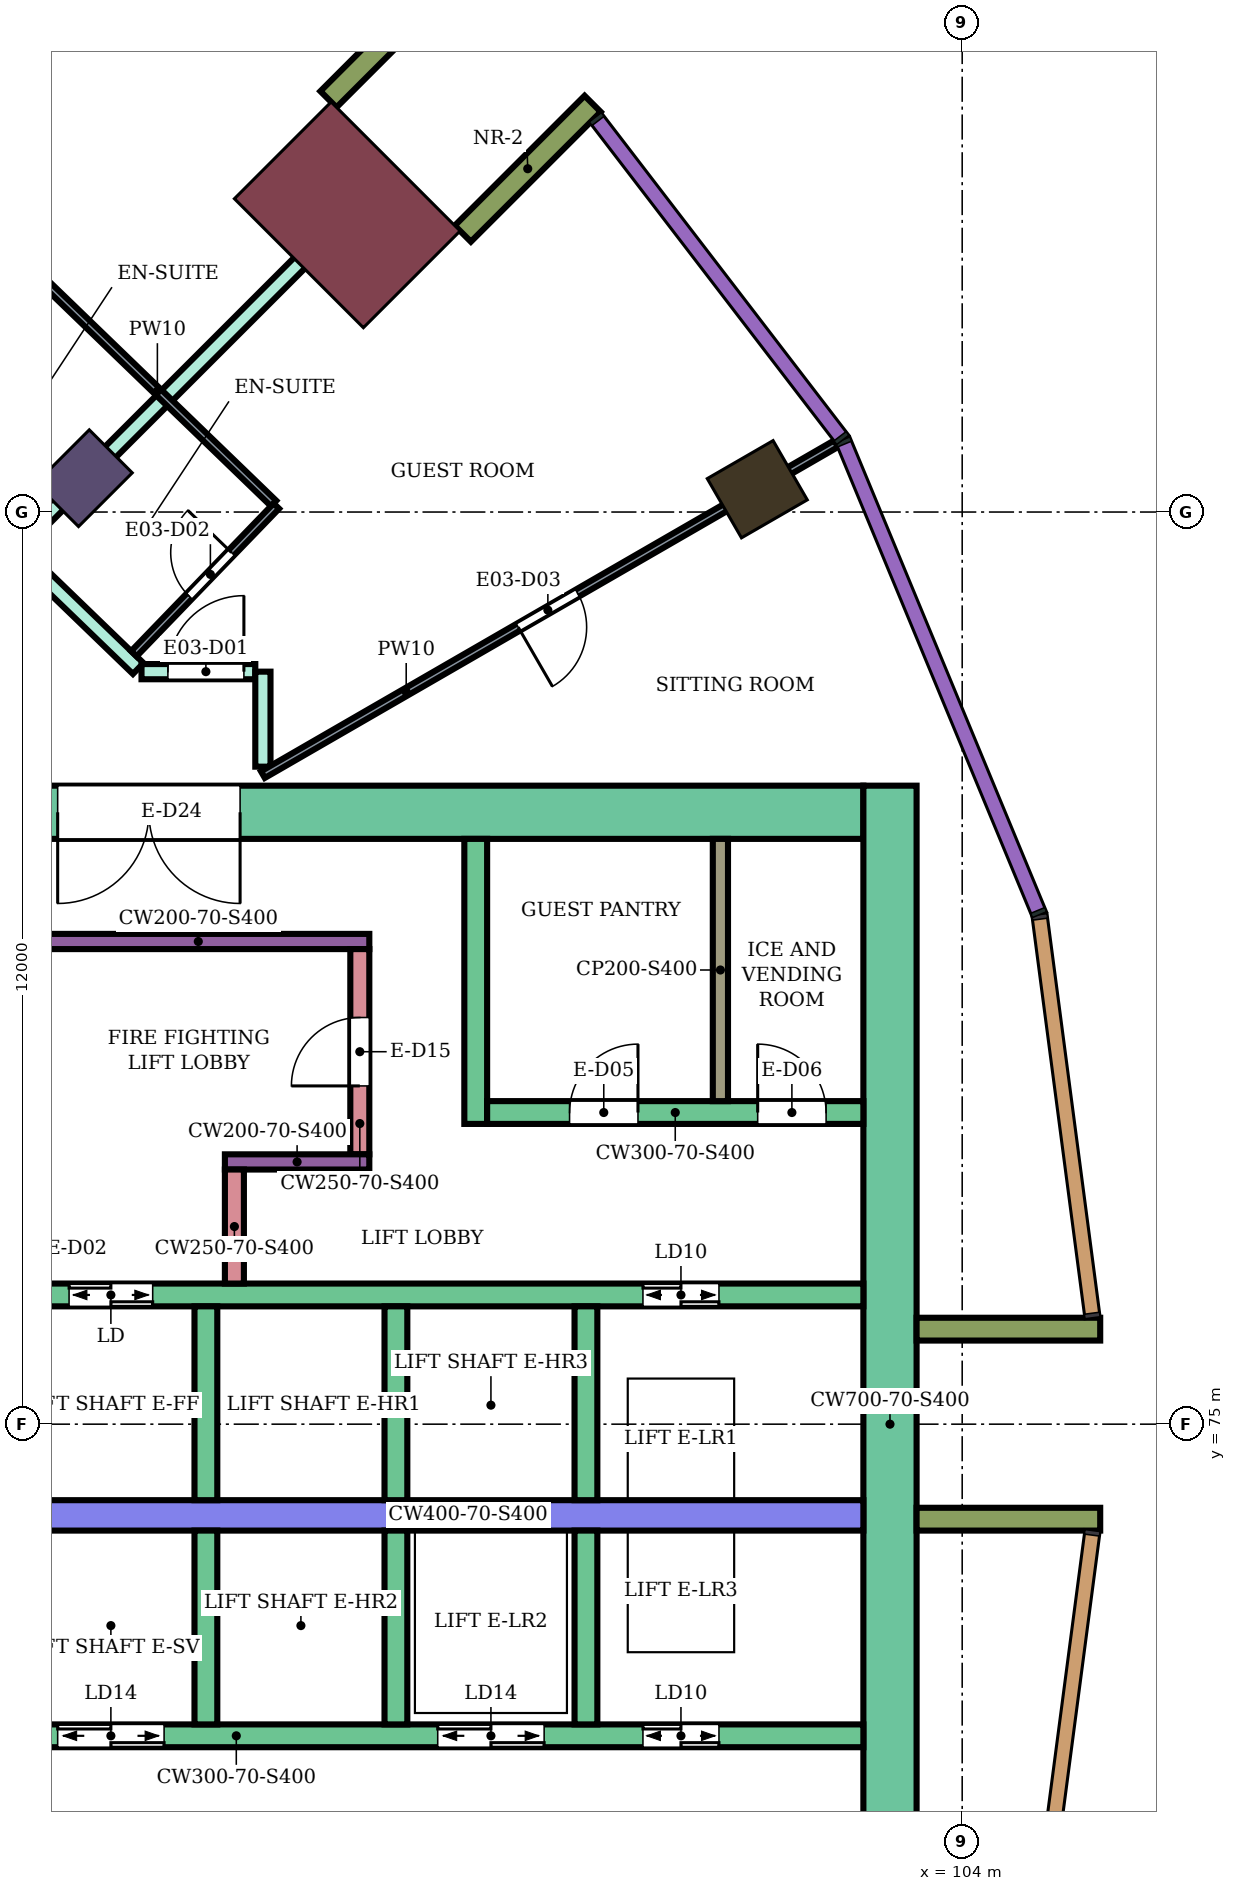
"""IFC4 building model, lengths in metres.
Left out: names, types, materials, properties, quantities, classifications, styles, units other than length and angle.
Written with IfcOpenShell. Run it as: python <this file> out.ifc"""

import sys

from ifc_helpers import new_model, si_unit, direction, frame, frame_2d, origin, origin_2d, place, context, subcontext, project, spatial, rectangle, extrude, element, fill, save


model = new_model("IFC4")
c1 = context("Model", 3, precision=1e-05, world=origin(), true_north=direction((0.0, 1.0)))
c2 = subcontext(c1, "Body", "Model", "MODEL_VIEW")
j1 = project(units=[si_unit("LENGTHUNIT", "METRE"), si_unit("PLANEANGLEUNIT", "RADIAN")], contexts=[c1])
p1 = place(None, origin())
s1 = spatial("IfcSite", under=j1, at=p1, CompositionType="ELEMENT")
p2 = place(p1, origin())
s2 = spatial("IfcBuilding", under=s1, at=p2, CompositionType="ELEMENT")
p3 = place(p2, frame((0.0, 0.0, 145.8)))
s3 = spatial("IfcBuildingStorey", under=s2, at=p3, CompositionType="ELEMENT", Elevation=145.8)
p4 = place(p3, frame((101.304, 87.3, 0.0), z_axis=(0.0, 0.0, 1.0), x_axis=(0.866025403784, 0.5, 0.0)))
e1 = element("IfcColumn", 1, at=p4, inside=s3, PredefinedType="COLUMN", context=c2, shape_type="SweptSolid", body=[
    extrude(rectangle(XDim=1.0, YDim=0.9, at=origin_2d()), origin(), (0.0, 0.0, 1.0), 3.9),
])
p5 = place(p3, frame((92.445, 87.445, 0.0), z_axis=(0.0, 0.0, 1.0), x_axis=(0.707106781187, 0.707106781187, 0.0)))
e2 = element("IfcColumn", 2, at=p5, inside=s3, PredefinedType="COLUMN", context=c2, shape_type="SweptSolid", body=[
    extrude(rectangle(XDim=1.0, YDim=0.8, at=origin_2d()), origin(), (0.0, 0.0, 1.0), 3.9),
])
p6 = place(p3, frame((95.91, 90.91, 0.0), z_axis=(0.0, 0.0, 1.0), x_axis=(0.707106781187, 0.707106781187, 0.0)))
e3 = element("IfcColumn", 3, at=p6, inside=s3, PredefinedType="COLUMN", context=c2, shape_type="SweptSolid", body=[
    extrude(rectangle(XDim=1.8, YDim=2.4, at=origin_2d()), origin(), (0.0, 0.0, 1.0), 3.9),
])
p7 = place(p3, frame((87.9, 83.05, 0.0), z_axis=(0.0, 0.0, 1.0), x_axis=(1.0, 0.0, 0.0)))
e4 = element("IfcWall", 4, at=p7, inside=s3, PredefinedType="SHEAR", context=c2, shape_type="SweptSolid", body=[
    extrude(rectangle(XDim=14.8, YDim=0.7, at=frame_2d((7.4, 0.0))), origin(), (0.0, 0.0, 1.0), 3.5),
])
p8 = place(p7, frame((4.2, 0.0, 0.0)))
e5 = element("IfcOpeningElement", 5, at=p8, cuts=e4, PredefinedType="OPENING", context=c2, shape_type="SweptSolid", body=[
    extrude(rectangle(XDim=2.4, YDim=2.4, at=frame_2d((1.2, 1.2))), frame((0.0, 0.36, 0.0), z_axis=(0.0, -1.0, 0.0), x_axis=(1.0, 0.0, 0.0)), (0.0, 0.0, 1.0), 0.72),
])
p9 = place(p3, frame((103.05, 66.6, 0.0), z_axis=(0.0, 0.0, 1.0), x_axis=(0.0, 1.0, 0.0)))
e6 = element("IfcWall", 6, at=p9, inside=s3, PredefinedType="SHEAR", context=c2, shape_type="SweptSolid", body=[
    extrude(rectangle(XDim=16.8, YDim=0.7, at=frame_2d((8.4, 0.0))), origin(), (0.0, 0.0, 1.0), 3.5),
])
p10 = place(p3, frame((91.7, 76.7, 0.0), z_axis=(0.0, 0.0, 1.0), x_axis=(1.0, 0.0, 0.0)))
e7 = element("IfcWall", 7, at=p10, inside=s3, PredefinedType="SHEAR", context=c2, shape_type="SweptSolid", body=[
    extrude(rectangle(XDim=11.0, YDim=0.3, at=frame_2d((5.5, 0.0))), origin(), (0.0, 0.0, 1.0), 3.5),
])
p11 = place(p10, frame((0.55, 0.0, 0.0)))
e8 = element("IfcOpeningElement", 8, at=p11, cuts=e7, PredefinedType="OPENING", context=c2, shape_type="SweptSolid", body=[
    extrude(rectangle(XDim=1.1, YDim=2.1, at=frame_2d((0.55, 1.05))), frame((0.0, 0.16, 0.0), z_axis=(0.0, -1.0, 0.0), x_axis=(1.0, 0.0, 0.0)), (0.0, 0.0, 1.0), 0.32),
])
p12 = place(p10, frame((8.1, 0.0, 0.0)))
e9 = element("IfcOpeningElement", 9, at=p12, cuts=e7, PredefinedType="OPENING", context=c2, shape_type="SweptSolid", body=[
    extrude(rectangle(XDim=1.0, YDim=2.1, at=frame_2d((0.5, 1.05))), frame((0.0, 0.16, 0.0), z_axis=(0.0, -1.0, 0.0), x_axis=(1.0, 0.0, 0.0)), (0.0, 0.0, 1.0), 0.32),
])
p13 = place(p3, frame((91.7, 73.8, 0.0), z_axis=(0.0, 0.0, 1.0), x_axis=(1.0, 0.0, 0.0)))
e10 = element("IfcWall", 10, at=p13, inside=s3, PredefinedType="SHEAR", context=c2, shape_type="SweptSolid", body=[
    extrude(rectangle(XDim=11.0, YDim=0.4, at=frame_2d((5.5, 0.0))), origin(), (0.0, 0.0, 1.0), 3.5),
])
p14 = place(p3, frame((91.7, 70.9, 0.0), z_axis=(0.0, 0.0, 1.0), x_axis=(1.0, 0.0, 0.0)))
e11 = element("IfcWall", 11, at=p14, inside=s3, PredefinedType="SHEAR", context=c2, shape_type="SweptSolid", body=[
    extrude(rectangle(XDim=11.0, YDim=0.3, at=frame_2d((5.5, 0.0))), origin(), (0.0, 0.0, 1.0), 3.5),
])
p15 = place(p14, frame((0.4, 0.0, 0.0)))
e12 = element("IfcOpeningElement", 12, at=p15, cuts=e11, PredefinedType="OPENING", context=c2, shape_type="SweptSolid", body=[
    extrude(rectangle(XDim=1.4, YDim=2.1, at=frame_2d((0.7, 1.05))), frame((0.0, 0.16, 0.0), z_axis=(0.0, -1.0, 0.0), x_axis=(1.0, 0.0, 0.0)), (0.0, 0.0, 1.0), 0.32),
])
p16 = place(p14, frame((5.4, 0.0, 0.0)))
e13 = element("IfcOpeningElement", 13, at=p16, cuts=e11, PredefinedType="OPENING", context=c2, shape_type="SweptSolid", body=[
    extrude(rectangle(XDim=1.4, YDim=2.1, at=frame_2d((0.7, 1.05))), frame((0.0, 0.16, 0.0), z_axis=(0.0, -1.0, 0.0), x_axis=(1.0, 0.0, 0.0)), (0.0, 0.0, 1.0), 0.32),
])
p17 = place(p14, frame((8.1, 0.0, 0.0)))
e14 = element("IfcOpeningElement", 14, at=p17, cuts=e11, PredefinedType="OPENING", context=c2, shape_type="SweptSolid", body=[
    extrude(rectangle(XDim=1.0, YDim=2.1, at=frame_2d((0.5, 1.05))), frame((0.0, 0.16, 0.0), z_axis=(0.0, -1.0, 0.0), x_axis=(1.0, 0.0, 0.0)), (0.0, 0.0, 1.0), 0.32),
])
for number, where, z_axis, x_axis in (
    (15, (94.05, 74.0, 0.0), (0.0, 0.0, 1.0), (0.0, 1.0, 0.0)),
    (16, (96.55, 74.0, 0.0), (0.0, 0.0, 1.0), (0.0, 1.0, 0.0)),
    (17, (99.05, 74.0, 0.0), (0.0, 0.0, 1.0), (0.0, 1.0, 0.0)),
    (18, (94.05, 71.05, 0.0), (0.0, 0.0, 1.0), (0.0, 1.0, 0.0)),
    (19, (96.55, 71.05, 0.0), (0.0, 0.0, 1.0), (0.0, 1.0, 0.0)),
    (20, (99.05, 71.05, 0.0), (0.0, 0.0, 1.0), (0.0, 1.0, 0.0)),
):
    element("IfcWall", number, at=place(p3, frame(where, z_axis=z_axis, x_axis=x_axis)), inside=s3, PredefinedType="SHEAR", context=c2, shape_type="SweptSolid", body=[
        extrude(rectangle(XDim=2.55, YDim=0.3, at=frame_2d((1.275, 0.0))), origin(), (0.0, 0.0, 1.0), 3.5),
    ])
p18 = place(p3, frame((91.7, 81.35, 0.0), z_axis=(0.0, 0.0, 1.0), x_axis=(1.0, 0.0, 0.0)))
e21 = element("IfcWall", 21, at=p18, inside=s3, PredefinedType="SHEAR", context=c2, shape_type="SweptSolid", body=[
    extrude(rectangle(XDim=4.5, YDim=0.2, at=frame_2d((2.25, 0.0))), origin(), (0.0, 0.0, 1.0), 3.5),
])
p19 = place(p3, frame((96.075, 78.55, 0.0), z_axis=(0.0, 0.0, 1.0), x_axis=(0.0, 1.0, 0.0)))
e22 = element("IfcWall", 22, at=p19, inside=s3, PredefinedType="SHEAR", context=c2, shape_type="SweptSolid", body=[
    extrude(rectangle(XDim=2.7, YDim=0.25, at=frame_2d((1.35, 0.0))), origin(), (0.0, 0.0, 1.0), 3.5),
])
p20 = place(p19, frame((0.9, 0.0, 0.0)))
e23 = element("IfcOpeningElement", 23, at=p20, cuts=e22, PredefinedType="OPENING", context=c2, shape_type="SweptSolid", body=[
    extrude(rectangle(XDim=0.9, YDim=2.1, at=frame_2d((0.45, 1.05))), frame((0.0, 0.135, 0.0), z_axis=(0.0, -1.0, 0.0), x_axis=(1.0, 0.0, 0.0)), (0.0, 0.0, 1.0), 0.27),
])
p21 = place(p3, frame((94.3, 78.45, 0.0), z_axis=(0.0, 0.0, 1.0), x_axis=(1.0, 0.0, 0.0)))
e24 = element("IfcWall", 24, at=p21, inside=s3, PredefinedType="SHEAR", context=c2, shape_type="SweptSolid", body=[
    extrude(rectangle(XDim=1.9, YDim=0.2, at=frame_2d((0.95, 0.0))), origin(), (0.0, 0.0, 1.0), 3.5),
])
p22 = place(p3, frame((94.425, 76.85, 0.0), z_axis=(0.0, 0.0, 1.0), x_axis=(0.0, 1.0, 0.0)))
e25 = element("IfcWall", 25, at=p22, inside=s3, PredefinedType="SHEAR", context=c2, shape_type="SweptSolid", body=[
    extrude(rectangle(XDim=1.5, YDim=0.25, at=frame_2d((0.75, 0.0))), origin(), (0.0, 0.0, 1.0), 3.5),
])
p23 = place(p3, frame((97.6, 78.95, 0.0), z_axis=(0.0, 0.0, 1.0), x_axis=(0.0, 1.0, 0.0)))
e26 = element("IfcWall", 26, at=p23, inside=s3, PredefinedType="SHEAR", context=c2, shape_type="SweptSolid", body=[
    extrude(rectangle(XDim=3.75, YDim=0.3, at=frame_2d((1.875, 0.0))), origin(), (0.0, 0.0, 1.0), 3.5),
])
p24 = place(p3, frame((97.75, 79.1, 0.0), z_axis=(0.0, 0.0, 1.0), x_axis=(1.0, 0.0, 0.0)))
e27 = element("IfcWall", 27, at=p24, inside=s3, PredefinedType="SHEAR", context=c2, shape_type="SweptSolid", body=[
    extrude(rectangle(XDim=4.95, YDim=0.3, at=frame_2d((2.475, 0.0))), origin(), (0.0, 0.0, 1.0), 3.5),
])
p25 = place(p24, frame((1.084, 0.0, 0.0)))
e28 = element("IfcOpeningElement", 28, at=p25, cuts=e27, PredefinedType="OPENING", context=c2, shape_type="SweptSolid", body=[
    extrude(rectangle(XDim=0.9, YDim=2.1, at=frame_2d((0.45, 1.05))), frame((0.0, 0.16, 0.0), z_axis=(0.0, -1.0, 0.0), x_axis=(1.0, 0.0, 0.0)), (0.0, 0.0, 1.0), 0.32),
])
p26 = place(p24, frame((3.56, 0.0, 0.0)))
e29 = element("IfcOpeningElement", 29, at=p26, cuts=e27, PredefinedType="OPENING", context=c2, shape_type="SweptSolid", body=[
    extrude(rectangle(XDim=0.9, YDim=2.1, at=frame_2d((0.45, 1.05))), frame((0.0, 0.16, 0.0), z_axis=(0.0, -1.0, 0.0), x_axis=(1.0, 0.0, 0.0)), (0.0, 0.0, 1.0), 0.32),
])
for number, where, z_axis, x_axis in (
    (30, (103.4, 73.75, 0.0), (0.0, 0.0, 1.0), (1.0, 0.0, 0.0)),
    (31, (103.4, 76.25, 0.0), (0.0, 0.0, 1.0), (1.0, 0.0, 0.0)),
    (32, (97.43, 90.662, 0.0), (0.0, 0.0, 1.0), (0.707, 0.707, 0.0)),
    (33, (95.662, 92.43, 0.0), (0.0, 0.0, 1.0), (0.707, 0.707, 0.0)),
):
    element("IfcWall", number, at=place(p3, frame(where, z_axis=z_axis, x_axis=x_axis)), inside=s3, PredefinedType="NOTDEFINED", context=c2, shape_type="SweptSolid", body=[
        extrude(rectangle(XDim=2.416, YDim=0.3, at=frame_2d((1.208, 0.0))), origin(), (0.0, 0.0, 1.0), 3.9),
    ])
p27 = place(p3, frame((88.386, 89.549, 0.0), z_axis=(0.0, 0.0, 1.0), x_axis=(0.719507339337, -0.694484836869, 0.0)))
e34 = element("IfcWall", 34, at=p27, inside=s3, PredefinedType="PARTITIONING", context=c2, shape_type="SweptSolid", body=[
    extrude(rectangle(XDim=6.635, YDim=0.2, at=frame_2d((3.317, 0.0))), origin(), (0.0, 0.0, 1.0), 3.45),
])
p28 = place(p3, frame((91.595, 86.591, 0.0), z_axis=(0.0, 0.0, 1.0), x_axis=(0.707214399597, 0.706999146394, 0.0)))
e35 = element("IfcWall", 35, at=p28, inside=s3, PredefinedType="PARTITIONING", context=c2, shape_type="SweptSolid", body=[
    extrude(rectangle(XDim=6.805, YDim=0.2, at=frame_2d((3.403, 0.0))), origin(), (0.0, 0.0, 1.0), 3.45),
])
p29 = place(p3, frame((93.203, 84.9, 0.0), z_axis=(0.0, 0.0, 1.0), x_axis=(1.0, 0.0, 0.0)))
e36 = element("IfcWall", 36, at=p29, inside=s3, PredefinedType="PARTITIONING", context=c2, shape_type="SweptSolid", body=[
    extrude(rectangle(XDim=1.497, YDim=0.2, at=frame_2d((0.749, 0.0))), origin(), (0.0, 0.0, 1.0), 3.45),
])
p30 = place(p29, frame((0.347, 0.0, 0.0)))
e37 = element("IfcOpeningElement", 37, at=p30, cuts=e36, PredefinedType="OPENING", context=c2, shape_type="SweptSolid", body=[
    extrude(rectangle(XDim=1.0, YDim=2.1, at=frame_2d((0.5, 1.05))), frame((0.0, 0.11, 0.0), z_axis=(0.0, -1.0, 0.0), x_axis=(1.0, 0.0, 0.0)), (0.0, 0.0, 1.0), 0.22),
])
p31 = place(p3, frame((94.8, 83.65, 0.0), z_axis=(0.0, 0.0, 1.0), x_axis=(0.0, 1.0, 0.0)))
e38 = element("IfcWall", 38, at=p31, inside=s3, PredefinedType="PARTITIONING", context=c2, shape_type="SweptSolid", body=[
    extrude(rectangle(XDim=1.25, YDim=0.2, at=frame_2d((0.625, 0.0))), origin(), (0.0, 0.0, 1.0), 3.45),
])
p32 = place(p3, frame((91.883, 90.066, 0.0), z_axis=(0.0, 0.0, 1.0), x_axis=(0.719460839421, -0.694533008963, 0.0)))
e39 = element("IfcWall", 39, at=p32, inside=s3, PredefinedType="PARTITIONING", context=c2, shape_type="SweptSolid", body=[
    extrude(rectangle(XDim=4.25, YDim=0.1, at=frame_2d((2.125, 0.0))), origin(), (0.0, 0.0, 1.0), 3.45),
])
p33 = place(p3, frame((93.103, 85.136, 0.0), z_axis=(0.0, 0.0, 1.0), x_axis=(0.694287838235, 0.719697434815, 0.0)))
e40 = element("IfcWall", 40, at=p33, inside=s3, PredefinedType="PARTITIONING", context=c2, shape_type="SweptSolid", body=[
    extrude(rectangle(XDim=2.7, YDim=0.1, at=frame_2d((1.35, 0.0))), origin(), (0.0, 0.0, 1.0), 3.45),
])
p34 = place(p33, frame((1.05, 0.0, 0.0)))
e41 = element("IfcOpeningElement", 41, at=p34, cuts=e40, PredefinedType="OPENING", context=c2, shape_type="SweptSolid", body=[
    extrude(rectangle(XDim=0.8, YDim=2.1, at=frame_2d((0.4, 1.05))), frame((0.0, 0.06, 0.0), z_axis=(0.0, -1.0, 0.0), x_axis=(1.0, 0.0, 0.0)), (0.0, 0.0, 1.0), 0.12),
])
p35 = place(p3, frame((94.8, 83.545, 0.0), z_axis=(0.0, 0.0, 1.0), x_axis=(0.86602264145, 0.500004784474, 0.0)))
e42 = element("IfcWall", 42, at=p35, inside=s3, PredefinedType="PARTITIONING", context=c2, shape_type="SweptSolid", body=[
    extrude(rectangle(XDim=8.708, YDim=0.1, at=frame_2d((4.354, 0.0))), origin(), (0.0, 0.0, 1.0), 3.45),
])
p36 = place(p35, frame((3.879, 0.0, 0.0)))
e43 = element("IfcOpeningElement", 43, at=p36, cuts=e42, PredefinedType="OPENING", context=c2, shape_type="SweptSolid", body=[
    extrude(rectangle(XDim=0.9, YDim=2.1, at=frame_2d((0.45, 1.05))), frame((0.0, 0.06, 0.0), z_axis=(0.0, -1.0, 0.0), x_axis=(1.0, 0.0, 0.0)), (0.0, 0.0, 1.0), 0.12),
])
p37 = place(p3, frame((100.819, 79.25, 0.0), z_axis=(0.0, 0.0, 1.0), x_axis=(0.0, 1.0, 0.0)))
e44 = element("IfcWall", 44, at=p37, inside=s3, PredefinedType="PARTITIONING", context=c2, shape_type="SweptSolid", body=[
    extrude(rectangle(XDim=3.45, YDim=0.2, at=frame_2d((1.725, 0.0))), origin(), (0.0, 0.0, 1.0), 3.5),
])
p38 = place(p30, origin())
e45 = element("IfcDoor", 45, at=p38, inside=s3, OperationType="SINGLE_SWING_RIGHT", PredefinedType="DOOR", context=c2, shape_type="SweptSolid", body=[
    extrude(rectangle(XDim=1.0, YDim=2.1, at=frame_2d((0.5, 1.05))), frame((0.0, 0.025, 0.0), z_axis=(0.0, -1.0, 0.0), x_axis=(1.0, 0.0, 0.0)), (0.0, 0.0, 1.0), 0.05),
])
fill(e37, e45)
p39 = place(p34, origin())
e46 = element("IfcDoor", 46, at=p39, inside=s3, OperationType="SINGLE_SWING_RIGHT", PredefinedType="DOOR", context=c2, shape_type="SweptSolid", body=[
    extrude(rectangle(XDim=0.8, YDim=2.1, at=frame_2d((0.4, 1.05))), frame((0.0, 0.025, 0.0), z_axis=(0.0, -1.0, 0.0), x_axis=(1.0, 0.0, 0.0)), (0.0, 0.0, 1.0), 0.05),
])
fill(e41, e46)
p40 = place(p36, frame((0.9, 0.0, 0.0), z_axis=(0.0, 0.0, 1.0), x_axis=(-1.0, 0.0, 0.0)))
e47 = element("IfcDoor", 47, at=p40, inside=s3, OperationType="SINGLE_SWING_RIGHT", PredefinedType="DOOR", context=c2, shape_type="SweptSolid", body=[
    extrude(rectangle(XDim=0.9, YDim=2.1, at=frame_2d((0.45, 1.05))), frame((0.0, 0.025, 0.0), z_axis=(0.0, -1.0, 0.0), x_axis=(1.0, 0.0, 0.0)), (0.0, 0.0, 1.0), 0.05),
])
fill(e43, e47)
p41 = place(p11, origin())
e48 = element("IfcDoor", 48, at=p41, inside=s3, OperationType="DOUBLE_DOOR_SLIDING", PredefinedType="DOOR", context=c2, shape_type="SweptSolid", body=[
    extrude(rectangle(XDim=1.1, YDim=2.1, at=frame_2d((0.55, 1.05))), frame((0.0, 0.025, 0.0), z_axis=(0.0, -1.0, 0.0), x_axis=(1.0, 0.0, 0.0)), (0.0, 0.0, 1.0), 0.05),
])
fill(e8, e48)
p42 = place(p12, origin())
e49 = element("IfcDoor", 49, at=p42, inside=s3, OperationType="DOUBLE_DOOR_SLIDING", PredefinedType="DOOR", context=c2, shape_type="SweptSolid", body=[
    extrude(rectangle(XDim=1.0, YDim=2.1, at=frame_2d((0.5, 1.05))), frame((0.0, 0.025, 0.0), z_axis=(0.0, -1.0, 0.0), x_axis=(1.0, 0.0, 0.0)), (0.0, 0.0, 1.0), 0.05),
])
fill(e9, e49)
p43 = place(p15, origin())
e50 = element("IfcDoor", 50, at=p43, inside=s3, OperationType="DOUBLE_DOOR_SLIDING", PredefinedType="DOOR", context=c2, shape_type="SweptSolid", body=[
    extrude(rectangle(XDim=1.4, YDim=2.1, at=frame_2d((0.7, 1.05))), frame((0.0, 0.025, 0.0), z_axis=(0.0, -1.0, 0.0), x_axis=(1.0, 0.0, 0.0)), (0.0, 0.0, 1.0), 0.05),
])
fill(e12, e50)
p44 = place(p16, origin())
e51 = element("IfcDoor", 51, at=p44, inside=s3, OperationType="DOUBLE_DOOR_SLIDING", PredefinedType="DOOR", context=c2, shape_type="SweptSolid", body=[
    extrude(rectangle(XDim=1.4, YDim=2.1, at=frame_2d((0.7, 1.05))), frame((0.0, 0.025, 0.0), z_axis=(0.0, -1.0, 0.0), x_axis=(1.0, 0.0, 0.0)), (0.0, 0.0, 1.0), 0.05),
])
fill(e13, e51)
p45 = place(p17, origin())
e52 = element("IfcDoor", 52, at=p45, inside=s3, OperationType="DOUBLE_DOOR_SLIDING", PredefinedType="DOOR", context=c2, shape_type="SweptSolid", body=[
    extrude(rectangle(XDim=1.0, YDim=2.1, at=frame_2d((0.5, 1.05))), frame((0.0, 0.025, 0.0), z_axis=(0.0, -1.0, 0.0), x_axis=(1.0, 0.0, 0.0)), (0.0, 0.0, 1.0), 0.05),
])
fill(e14, e52)
p46 = place(p20, origin())
e53 = element("IfcDoor", 53, at=p46, inside=s3, OperationType="SINGLE_SWING_LEFT", PredefinedType="DOOR", context=c2, shape_type="SweptSolid", body=[
    extrude(rectangle(XDim=0.9, YDim=2.1, at=frame_2d((0.45, 1.05))), frame((0.0, 0.025, 0.0), z_axis=(0.0, -1.0, 0.0), x_axis=(1.0, 0.0, 0.0)), (0.0, 0.0, 1.0), 0.05),
])
fill(e23, e53)
p47 = place(p25, origin())
e54 = element("IfcDoor", 54, at=p47, inside=s3, OperationType="SINGLE_SWING_RIGHT", PredefinedType="DOOR", context=c2, shape_type="SweptSolid", body=[
    extrude(rectangle(XDim=0.9, YDim=2.1, at=frame_2d((0.45, 1.05))), frame((0.0, 0.025, 0.0), z_axis=(0.0, -1.0, 0.0), x_axis=(1.0, 0.0, 0.0)), (0.0, 0.0, 1.0), 0.05),
])
fill(e28, e54)
p48 = place(p26, origin())
e55 = element("IfcDoor", 55, at=p48, inside=s3, OperationType="SINGLE_SWING_LEFT", PredefinedType="DOOR", context=c2, shape_type="SweptSolid", body=[
    extrude(rectangle(XDim=0.9, YDim=2.1, at=frame_2d((0.45, 1.05))), frame((0.0, 0.025, 0.0), z_axis=(0.0, -1.0, 0.0), x_axis=(1.0, 0.0, 0.0)), (0.0, 0.0, 1.0), 0.05),
])
fill(e29, e55)
p49 = place(p8, frame((2.4, 0.0, 0.0), z_axis=(0.0, 0.0, 1.0), x_axis=(-1.0, 0.0, 0.0)))
e56 = element("IfcDoor", 56, at=p49, inside=s3, OperationType="DOUBLE_DOOR_SINGLE_SWING", PredefinedType="DOOR", context=c2, shape_type="SweptSolid", body=[
    extrude(rectangle(XDim=2.4, YDim=2.4, at=frame_2d((1.2, 1.2))), frame((0.0, 0.025, 0.0), z_axis=(0.0, -1.0, 0.0), x_axis=(1.0, 0.0, 0.0)), (0.0, 0.0, 1.0), 0.05),
])
fill(e5, e56)
save(model, sys.argv[1])
